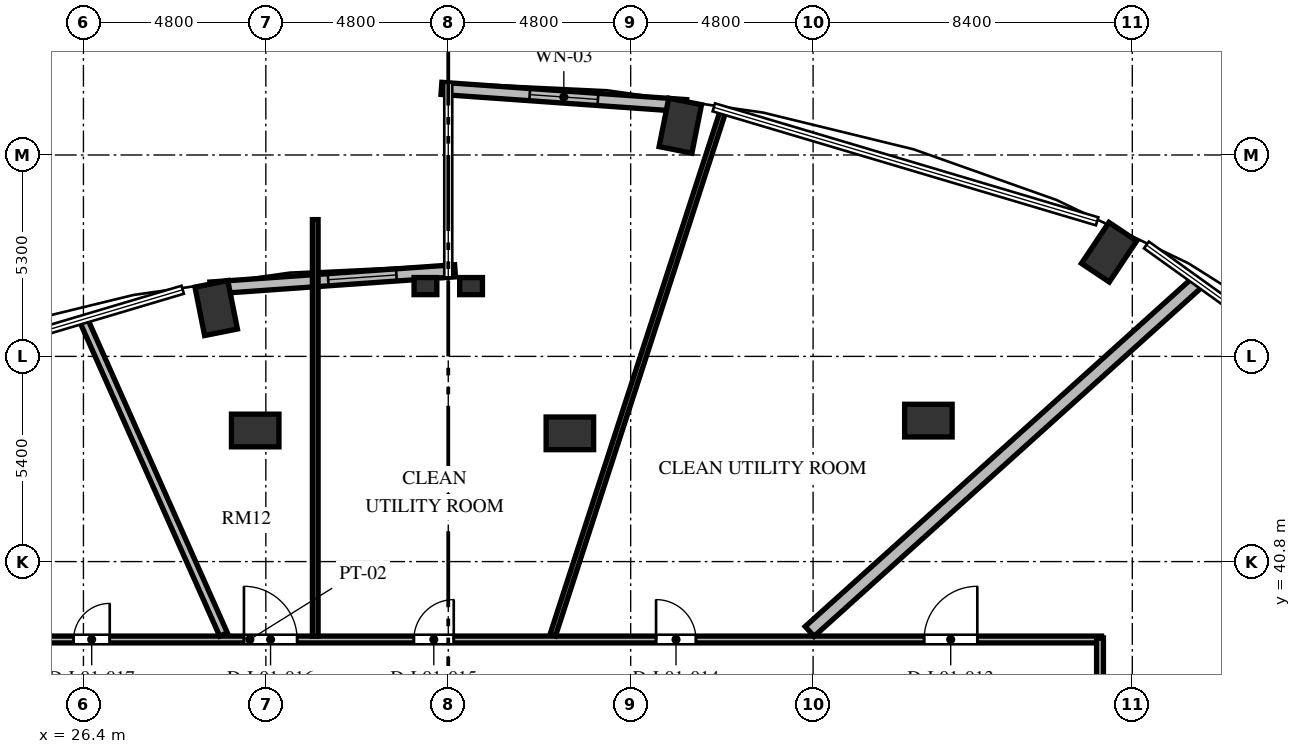
"""IFC4 building model, lengths in metres.
Left out: names, types, materials, properties, quantities, classifications, styles, units other than length and angle.
Written with IfcOpenShell. Run it as: python <this file> out.ifc"""

import sys

from ifc_helpers import new_model, si_unit, direction, frame, frame_2d, origin, origin_2d, place, context, subcontext, project, spatial, rectangle, extrude, element, fill, save


model = new_model("IFC4")
c1 = context("Model", 3, precision=1e-05, world=origin(), true_north=direction((0.0, 1.0)))
c2 = subcontext(c1, "Body", "Model", "MODEL_VIEW")
j1 = project(units=[si_unit("LENGTHUNIT", "METRE"), si_unit("PLANEANGLEUNIT", "RADIAN")], contexts=[c1])
p1 = place(None, origin())
s1 = spatial("IfcSite", under=j1, at=p1, CompositionType="ELEMENT")
p2 = place(p1, origin())
s2 = spatial("IfcBuilding", under=s1, at=p2, CompositionType="ELEMENT")
p3 = place(p2, frame((0.0, 0.0, 6.0)))
s3 = spatial("IfcBuildingStorey", under=s2, at=p3, CompositionType="ELEMENT", Elevation=6.0)
for number, where, z_axis, x_axis in (
    (1, (53.389, 48.942, 0.0), (0.0, 0.0, 1.0), (0.556, 0.831, 0.0)),
    (2, (42.106, 52.271, 0.0), (0.0, 0.0, 1.0), (0.195, 0.981, 0.0)),
    (3, (29.894, 47.471, 0.0), (0.0, 0.0, 1.0), (-0.195, 0.981, 0.0)),
):
    element("IfcColumn", number, at=place(p3, frame(where, z_axis=z_axis, x_axis=x_axis)), inside=s3, PredefinedType="COLUMN", context=c2, shape_type="SweptSolid", body=[
        extrude(rectangle(XDim=1.3, YDim=0.88, at=origin_2d()), origin(), (0.0, 0.0, 1.0), 4.8),
    ])
for number, where, z_axis, x_axis in (
    (4, (48.634, 44.51, 0.0), (0.0, 0.0, 1.0), (1.0, 0.0, 0.0)),
    (5, (39.2, 44.175, 0.0), (0.0, 0.0, 1.0), (1.0, 0.0, 0.0)),
    (6, (30.92, 44.25, 0.0), (0.0, 0.0, 1.0), (1.0, 0.0, 0.0)),
):
    element("IfcColumn", number, at=place(p3, frame(where, z_axis=z_axis, x_axis=x_axis)), inside=s3, PredefinedType="COLUMN", context=c2, shape_type="SweptSolid", body=[
        extrude(rectangle(XDim=1.25, YDim=0.86, at=origin_2d()), origin(), (0.0, 0.0, 1.0), 4.8),
    ])
for number, where, z_axis, x_axis in (
    (7, (35.4, 48.05, 0.0), (0.0, 0.0, 1.0), (1.0, 0.0, 0.0)),
    (8, (36.6, 48.05, 0.0), (0.0, 0.0, 1.0), (1.0, 0.0, 0.0)),
):
    element("IfcColumn", number, at=place(p3, frame(where, z_axis=z_axis, x_axis=x_axis)), inside=s3, PredefinedType="PILASTER", context=c2, shape_type="SweptSolid", body=[
        extrude(rectangle(XDim=0.6, YDim=0.45, at=origin_2d()), origin(), (0.0, 0.0, 1.0), 4.8),
    ])
p4 = place(p3, frame((42.262, 52.798, 0.0), z_axis=(0.0, 0.0, 1.0), x_axis=(-0.99751367159, 0.070473221795, 0.0)))
e9 = element("IfcWall", 9, at=p4, inside=s3, PredefinedType="SOLIDWALL", context=c2, shape_type="SweptSolid", body=[
    extrude(rectangle(XDim=6.458, YDim=0.32, at=frame_2d((3.229, 0.0))), origin(), (0.0, 0.0, 1.0), 4.52),
])
p5 = place(p4, frame((2.329, 0.0, 0.85)))
e10 = element("IfcOpeningElement", 10, at=p5, cuts=e9, PredefinedType="OPENING", context=c2, shape_type="SweptSolid", body=[
    extrude(rectangle(XDim=1.8, YDim=2.4, at=frame_2d((0.9, 1.2))), frame((0.0, 0.17, 0.0), z_axis=(0.0, -1.0, 0.0), x_axis=(1.0, 0.0, 0.0)), (0.0, 0.0, 1.0), 0.34),
])
p6 = place(p3, frame((36.179, 48.453, 0.0), z_axis=(0.0, 0.0, 1.0), x_axis=(-0.997513108184, -0.070481196075, 0.0)))
e11 = element("IfcWall", 11, at=p6, inside=s3, PredefinedType="SOLIDWALL", context=c2, shape_type="SweptSolid", body=[
    extrude(rectangle(XDim=6.457, YDim=0.32, at=frame_2d((3.229, 0.0))), origin(), (0.0, 0.0, 1.0), 4.52),
])
p7 = place(p6, frame((1.548, 0.0, 0.85)))
e12 = element("IfcOpeningElement", 12, at=p7, cuts=e11, PredefinedType="OPENING", context=c2, shape_type="SweptSolid", body=[
    extrude(rectangle(XDim=1.8, YDim=2.4, at=frame_2d((0.9, 1.2))), frame((0.0, 0.17, 0.0), z_axis=(0.0, -1.0, 0.0), x_axis=(1.0, 0.0, 0.0)), (0.0, 0.0, 1.0), 0.34),
])
p8 = place(p3, frame((23.31, 38.75, 0.0), z_axis=(0.0, 0.0, 1.0), x_axis=(1.0, 0.0, 0.0)))
e13 = element("IfcWall", 13, at=p8, inside=s3, PredefinedType="PARTITIONING", context=c2, shape_type="SweptSolid", body=[
    extrude(rectangle(XDim=29.88, YDim=0.18, at=frame_2d((14.94, 0.0))), origin(), (0.0, 0.0, 1.0), 4.52),
])
p9 = place(p8, frame((25.211, 0.0, 0.0)))
e14 = element("IfcOpeningElement", 14, at=p9, cuts=e13, PredefinedType="OPENING", context=c2, shape_type="SweptSolid", body=[
    extrude(rectangle(XDim=1.4, YDim=2.2, at=frame_2d((0.7, 1.1))), frame((0.0, 0.1, 0.0), z_axis=(0.0, -1.0, 0.0), x_axis=(1.0, 0.0, 0.0)), (0.0, 0.0, 1.0), 0.2),
])
p10 = place(p8, frame((18.158, 0.0, 0.0)))
e15 = element("IfcOpeningElement", 15, at=p10, cuts=e13, PredefinedType="OPENING", context=c2, shape_type="SweptSolid", body=[
    extrude(rectangle(XDim=1.05, YDim=2.15, at=frame_2d((0.525, 1.075))), frame((0.0, 0.1, 0.0), z_axis=(0.0, -1.0, 0.0), x_axis=(1.0, 0.0, 0.0)), (0.0, 0.0, 1.0), 0.2),
])
p11 = place(p8, frame((11.785, 0.0, 0.0)))
e16 = element("IfcOpeningElement", 16, at=p11, cuts=e13, PredefinedType="OPENING", context=c2, shape_type="SweptSolid", body=[
    extrude(rectangle(XDim=1.05, YDim=2.15, at=frame_2d((0.525, 1.075))), frame((0.0, 0.1, 0.0), z_axis=(0.0, -1.0, 0.0), x_axis=(1.0, 0.0, 0.0)), (0.0, 0.0, 1.0), 0.2),
])
p12 = place(p8, frame((7.314, 0.0, 0.0)))
e17 = element("IfcOpeningElement", 17, at=p12, cuts=e13, PredefinedType="OPENING", context=c2, shape_type="SweptSolid", body=[
    extrude(rectangle(XDim=1.4, YDim=2.2, at=frame_2d((0.7, 1.1))), frame((0.0, 0.1, 0.0), z_axis=(0.0, -1.0, 0.0), x_axis=(1.0, 0.0, 0.0)), (0.0, 0.0, 1.0), 0.2),
])
p13 = place(p8, frame((2.832, 0.0, 0.0)))
e18 = element("IfcOpeningElement", 18, at=p13, cuts=e13, PredefinedType="OPENING", context=c2, shape_type="SweptSolid", body=[
    extrude(rectangle(XDim=0.95, YDim=2.1, at=frame_2d((0.475, 1.05))), frame((0.0, 0.1, 0.0), z_axis=(0.0, -1.0, 0.0), x_axis=(1.0, 0.0, 0.0)), (0.0, 0.0, 1.0), 0.2),
])
p14 = place(p3, frame((53.15, 38.79, 0.0), z_axis=(0.0, 0.0, 1.0), x_axis=(0.0, -1.0, 0.0)))
e19 = element("IfcWall", 19, at=p14, inside=s3, PredefinedType="PARTITIONING", context=c2, shape_type="SweptSolid", body=[
    extrude(rectangle(XDim=9.43, YDim=0.18, at=frame_2d((4.715, 0.0))), origin(), (0.0, 0.0, 1.0), 4.205),
])
p15 = place(p3, frame((45.509, 38.962, 0.0), z_axis=(0.0, 0.0, 1.0), x_axis=(0.743143036481, 0.669132593236, 0.0)))
e20 = element("IfcWall", 20, at=p15, inside=s3, PredefinedType="SOLIDWALL", context=c2, shape_type="SweptSolid", body=[
    extrude(rectangle(XDim=13.739, YDim=0.35, at=frame_2d((6.87, 0.0))), origin(), (0.0, 0.0, 1.0), 4.52),
])
p16 = place(p3, frame((38.75, 38.862, 0.0), z_axis=(0.0, 0.0, 1.0), x_axis=(0.309009259577, 0.951059029449, 0.0)))
e21 = element("IfcWall", 21, at=p16, inside=s3, PredefinedType="PARTITIONING", context=c2, shape_type="SweptSolid", body=[
    extrude(rectangle(XDim=14.518, YDim=0.15, at=frame_2d((7.259, 0.0))), origin(), (0.0, 0.0, 1.0), 4.52),
])
p17 = place(p3, frame((30.086, 38.883, 0.0), z_axis=(0.0, 0.0, 1.0), x_axis=(-0.406742961245, 0.913542644586, 0.0)))
e22 = element("IfcWall", 22, at=p17, inside=s3, PredefinedType="PARTITIONING", context=c2, shape_type="SweptSolid", body=[
    extrude(rectangle(XDim=9.067, YDim=0.22, at=frame_2d((4.534, 0.0))), origin(), (0.0, 0.0, 1.0), 4.52),
])
p18 = place(p3, frame((32.5, 38.84, 0.0), z_axis=(0.0, 0.0, 1.0), x_axis=(0.0, 1.0, 0.0)))
e23 = element("IfcWall", 23, at=p18, inside=s3, PredefinedType="PARTITIONING", context=c2, shape_type="SweptSolid", body=[
    extrude(rectangle(XDim=10.959, YDim=0.15, at=frame_2d((5.48, 0.0))), origin(), (0.0, 0.0, 1.0), 4.52),
])
p19 = place(p5, origin())
e24 = element("IfcWindow", 24, at=p19, inside=s3, PartitioningType="SINGLE_PANEL", PredefinedType="WINDOW", context=c2, shape_type="SweptSolid", body=[
    extrude(rectangle(XDim=1.8, YDim=2.4, at=frame_2d((0.9, 1.2))), frame((0.0, 0.03, 0.0), z_axis=(0.0, -1.0, 0.0), x_axis=(1.0, 0.0, 0.0)), (0.0, 0.0, 1.0), 0.06),
])
fill(e10, e24)
p20 = place(p7, origin())
e25 = element("IfcWindow", 25, at=p20, inside=s3, PartitioningType="SINGLE_PANEL", PredefinedType="WINDOW", context=c2, shape_type="SweptSolid", body=[
    extrude(rectangle(XDim=1.8, YDim=2.4, at=frame_2d((0.9, 1.2))), frame((0.0, 0.03, 0.0), z_axis=(0.0, -1.0, 0.0), x_axis=(1.0, 0.0, 0.0)), (0.0, 0.0, 1.0), 0.06),
])
fill(e12, e25)
p21 = place(p9, origin())
e26 = element("IfcDoor", 26, at=p21, inside=s3, OperationType="SINGLE_SWING_RIGHT", PredefinedType="DOOR", context=c2, shape_type="SweptSolid", body=[
    extrude(rectangle(XDim=1.4, YDim=2.2, at=frame_2d((0.7, 1.1))), frame((0.0, 0.025, 0.0), z_axis=(0.0, -1.0, 0.0), x_axis=(1.0, 0.0, 0.0)), (0.0, 0.0, 1.0), 0.05),
])
fill(e14, e26)
p22 = place(p10, origin())
e27 = element("IfcDoor", 27, at=p22, inside=s3, OperationType="SINGLE_SWING_LEFT", PredefinedType="DOOR", context=c2, shape_type="SweptSolid", body=[
    extrude(rectangle(XDim=1.05, YDim=2.15, at=frame_2d((0.525, 1.075))), frame((0.0, 0.025, 0.0), z_axis=(0.0, -1.0, 0.0), x_axis=(1.0, 0.0, 0.0)), (0.0, 0.0, 1.0), 0.05),
])
fill(e15, e27)
p23 = place(p11, origin())
e28 = element("IfcDoor", 28, at=p23, inside=s3, OperationType="SINGLE_SWING_RIGHT", PredefinedType="DOOR", context=c2, shape_type="SweptSolid", body=[
    extrude(rectangle(XDim=1.05, YDim=2.15, at=frame_2d((0.525, 1.075))), frame((0.0, 0.025, 0.0), z_axis=(0.0, -1.0, 0.0), x_axis=(1.0, 0.0, 0.0)), (0.0, 0.0, 1.0), 0.05),
])
fill(e16, e28)
p24 = place(p12, origin())
e29 = element("IfcDoor", 29, at=p24, inside=s3, OperationType="SINGLE_SWING_LEFT", PredefinedType="DOOR", context=c2, shape_type="SweptSolid", body=[
    extrude(rectangle(XDim=1.4, YDim=2.2, at=frame_2d((0.7, 1.1))), frame((0.0, 0.025, 0.0), z_axis=(0.0, -1.0, 0.0), x_axis=(1.0, 0.0, 0.0)), (0.0, 0.0, 1.0), 0.05),
])
fill(e17, e29)
p25 = place(p13, origin())
e30 = element("IfcDoor", 30, at=p25, inside=s3, OperationType="SINGLE_SWING_RIGHT", PredefinedType="DOOR", context=c2, shape_type="SweptSolid", body=[
    extrude(rectangle(XDim=0.95, YDim=2.1, at=frame_2d((0.475, 1.05))), frame((0.0, 0.025, 0.0), z_axis=(0.0, -1.0, 0.0), x_axis=(1.0, 0.0, 0.0)), (0.0, 0.0, 1.0), 0.05),
])
fill(e18, e30)
save(model, sys.argv[1])
